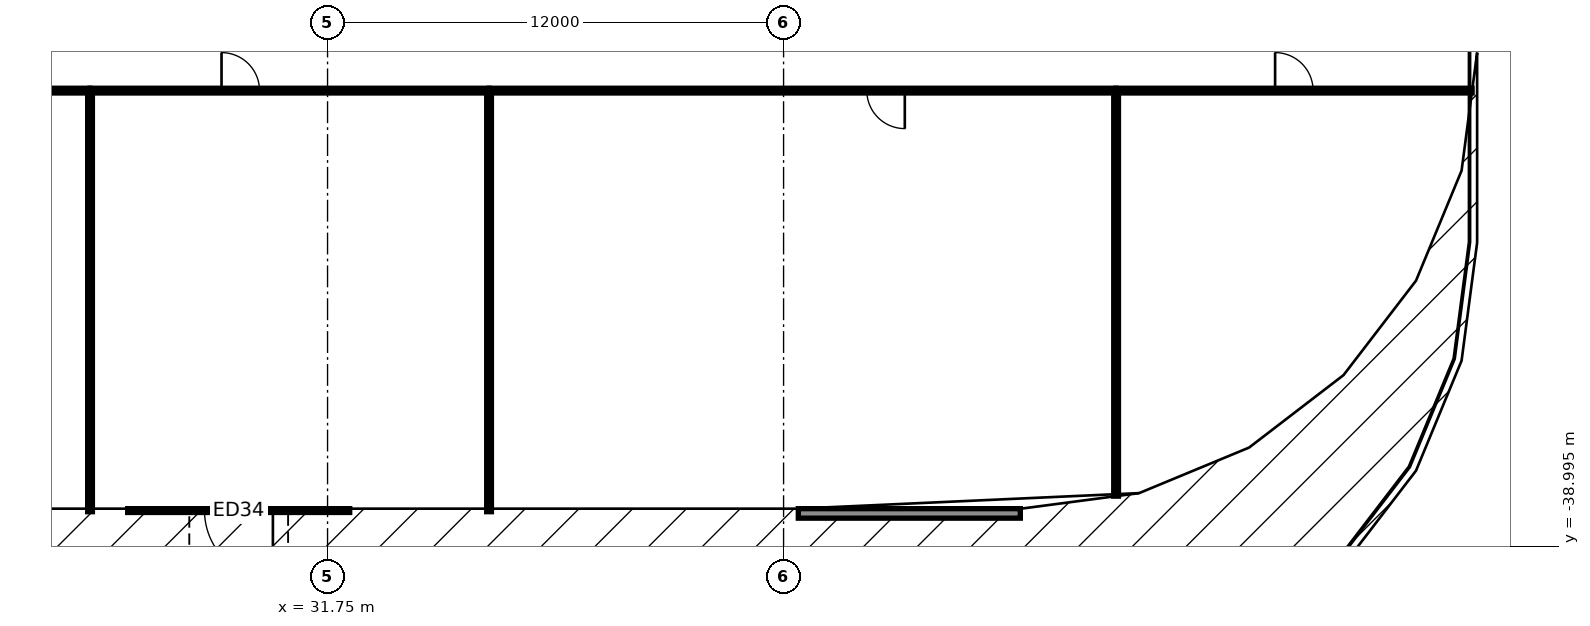
"""IFC4 building model, lengths in metres.
Left out: names, types, materials, properties, quantities, classifications, styles, units other than length and angle.
Written with IfcOpenShell. Run it as: python <this file> out.ifc"""

import sys

from ifc_helpers import new_model, si_unit, direction, frame, frame_2d, origin, origin_2d, place, context, subcontext, project, spatial, rectangle, circle, extrude, element, fill, save


model = new_model("IFC4")
c1 = context("Model", 3, precision=1e-05, world=origin(), true_north=direction((0.0, 1.0)))
c2 = subcontext(c1, "Body", "Model", "MODEL_VIEW")
j1 = project(units=[si_unit("LENGTHUNIT", "METRE"), si_unit("PLANEANGLEUNIT", "RADIAN")], contexts=[c1])
p1 = place(None, origin())
s1 = spatial("IfcSite", under=j1, at=p1, CompositionType="ELEMENT")
p2 = place(p1, origin())
s2 = spatial("IfcBuilding", under=s1, at=p2, CompositionType="ELEMENT")
p3 = place(p2, frame((0.0, 0.0, 12.0)))
s3 = spatial("IfcBuildingStorey", under=s2, at=p3, CompositionType="ELEMENT", Elevation=12.0)
p4 = place(p3, frame((29.4, -31.0, 0.0), z_axis=(0.0, 0.0, 1.0), x_axis=(1.0, 0.0, 0.0)))
e1 = element("IfcColumn", 1, at=p4, inside=s3, PredefinedType="COLUMN", context=c2, shape_type="SweptSolid", body=[
    extrude(circle(Radius=0.6, at=origin_2d()), origin(), (0.0, 0.0, 1.0), 4.5),
])
p5 = place(p3, frame((37.8, -36.0, 0.0), z_axis=(0.0, 0.0, 1.0), x_axis=(1.0, 0.0, 0.0)))
e2 = element("IfcColumn", 2, at=p5, inside=s3, PredefinedType="COLUMN", context=c2, shape_type="SweptSolid", body=[
    extrude(circle(Radius=0.6, at=origin_2d()), origin(), (0.0, 0.0, 1.0), 4.2),
])
for number, where, z_axis, x_axis in (
    (3, (37.8, -31.0, 0.0), (0.0, 0.0, 1.0), (1.0, 0.0, 0.0)),
    (4, (54.6, -26.0, 0.0), (0.0, 0.0, 1.0), (1.0, 0.0, 0.0)),
):
    element("IfcColumn", number, at=place(p3, frame(where, z_axis=z_axis, x_axis=x_axis)), inside=s3, PredefinedType="COLUMN", context=c2, shape_type="SweptSolid", body=[
        extrude(circle(Radius=0.6, at=origin_2d()), origin(), (0.0, 0.0, 1.0), 4.5),
    ])
p6 = place(p3, frame((59.4, -26.0, 0.0), z_axis=(0.0, 0.0, 1.0), x_axis=(1.0, 0.0, 0.0)))
e5 = element("IfcColumn", 5, at=p6, inside=s3, PredefinedType="COLUMN", context=c2, shape_type="SweptSolid", body=[
    extrude(circle(Radius=0.6, at=origin_2d()), origin(), (0.0, 0.0, 1.0), 4.2),
])
p7 = place(p3, frame((49.98, -38.125, 0.0), z_axis=(0.0, 0.0, 1.0), x_axis=(-1.0, 0.0, 0.0)))
e6 = element("IfcWall", 6, at=p7, inside=s3, PredefinedType="STANDARD", context=c2, shape_type="SweptSolid", body=[
    extrude(rectangle(XDim=5.842, YDim=0.25, at=frame_2d((2.921, 0.0))), origin(), (0.0, 0.0, 1.0), 4.5),
])
p8 = place(p7, frame((1.721, 0.0, 0.9)))
e7 = element("IfcOpeningElement", 7, at=p8, cuts=e6, PredefinedType="OPENING", context=c2, shape_type="SweptSolid", body=[
    extrude(rectangle(XDim=2.4, YDim=1.8, at=frame_2d((1.2, 0.9))), frame((0.0, 0.135, 0.0), z_axis=(0.0, -1.0, 0.0), x_axis=(1.0, 0.0, 0.0)), (0.0, 0.0, 1.0), 0.27),
])
p9 = place(p3, frame((32.333, -38.05, 0.0), z_axis=(0.0, 0.0, 1.0), x_axis=(-1.0, 0.0, 0.0)))
e8 = element("IfcWall", 8, at=p9, inside=s3, PredefinedType="STANDARD", context=c2, shape_type="SweptSolid", body=[
    extrude(rectangle(XDim=5.843, YDim=0.1, at=frame_2d((2.921, 0.0))), origin(), (0.0, 0.0, 1.0), 4.5),
])
p10 = place(p9, frame((2.021, 0.0, 0.0)))
e9 = element("IfcOpeningElement", 9, at=p10, cuts=e8, PredefinedType="OPENING", context=c2, shape_type="SweptSolid", body=[
    extrude(rectangle(XDim=1.8, YDim=2.4, at=frame_2d((0.9, 1.2))), frame((0.0, 0.06, 0.0), z_axis=(0.0, -1.0, 0.0), x_axis=(1.0, 0.0, 0.0)), (0.0, 0.0, 1.0), 0.12),
])
p11 = place(p3, frame((15.0, -27.0, 0.0), z_axis=(0.0, 0.0, 1.0), x_axis=(1.0, 0.0, 0.0)))
e10 = element("IfcWall", 10, at=p11, inside=s3, PredefinedType="PARTITIONING", context=c2, shape_type="SweptSolid", body=[
    extrude(rectangle(XDim=10.5, YDim=0.125, at=frame_2d((5.25, 0.0))), origin(), (0.0, 0.0, 1.0), 2.68),
])
p12 = place(p11, frame((4.75, 0.0, 0.0)))
e11 = element("IfcOpeningElement", 11, at=p12, cuts=e10, PredefinedType="OPENING", context=c2, shape_type="SweptSolid", body=[
    extrude(rectangle(XDim=1.0, YDim=2.4, at=frame_2d((0.5, 1.2))), frame((0.0, 0.073, 0.0), z_axis=(0.0, -1.0, 0.0), x_axis=(1.0, 0.0, 0.0)), (0.0, 0.0, 1.0), 0.145),
])
p13 = place(p3, frame((25.5, -27.0, 0.0), z_axis=(0.0, 0.0, 1.0), x_axis=(1.0, 0.0, 0.0)))
e12 = element("IfcWall", 12, at=p13, inside=s3, PredefinedType="PARTITIONING", context=c2, shape_type="SweptSolid", body=[
    extrude(rectangle(XDim=10.5, YDim=0.125, at=frame_2d((5.25, 0.0))), origin(), (0.0, 0.0, 1.0), 2.68),
])
p14 = place(p13, frame((3.46, 0.0, 0.0)))
e13 = element("IfcOpeningElement", 13, at=p14, cuts=e12, PredefinedType="OPENING", context=c2, shape_type="SweptSolid", body=[
    extrude(rectangle(XDim=1.0, YDim=2.1, at=frame_2d((0.5, 1.05))), frame((0.0, 0.073, 0.0), z_axis=(0.0, -1.0, 0.0), x_axis=(1.0, 0.0, 0.0)), (0.0, 0.0, 1.0), 0.145),
])
p15 = place(p3, frame((36.0, -27.0, 0.0), z_axis=(0.0, 0.0, 1.0), x_axis=(1.0, 0.0, 0.0)))
e14 = element("IfcWall", 14, at=p15, inside=s3, PredefinedType="PARTITIONING", context=c2, shape_type="SweptSolid", body=[
    extrude(rectangle(XDim=16.5, YDim=0.125, at=frame_2d((8.25, 0.0))), origin(), (0.0, 0.0, 1.0), 2.68),
])
p16 = place(p15, frame((9.94, 0.0, 0.0)))
e15 = element("IfcOpeningElement", 15, at=p16, cuts=e14, PredefinedType="OPENING", context=c2, shape_type="SweptSolid", body=[
    extrude(rectangle(XDim=1.0, YDim=2.1, at=frame_2d((0.5, 1.05))), frame((0.0, 0.073, 0.0), z_axis=(0.0, -1.0, 0.0), x_axis=(1.0, 0.0, 0.0)), (0.0, 0.0, 1.0), 0.145),
])
p17 = place(p3, frame((52.5, -27.0, 0.0), z_axis=(0.0, 0.0, 1.0), x_axis=(1.0, 0.0, 0.0)))
e16 = element("IfcWall", 16, at=p17, inside=s3, PredefinedType="PARTITIONING", context=c2, shape_type="SweptSolid", body=[
    extrude(rectangle(XDim=9.368, YDim=0.125, at=frame_2d((4.684, 0.0))), origin(), (0.0, 0.0, 1.0), 2.68),
])
p18 = place(p17, frame((4.184, 0.0, 0.0)))
e17 = element("IfcOpeningElement", 17, at=p18, cuts=e16, PredefinedType="OPENING", context=c2, shape_type="SweptSolid", body=[
    extrude(rectangle(XDim=1.0, YDim=2.1, at=frame_2d((0.5, 1.05))), frame((0.0, 0.073, 0.0), z_axis=(0.0, -1.0, 0.0), x_axis=(1.0, 0.0, 0.0)), (0.0, 0.0, 1.0), 0.145),
])
for number, where, z_axis, x_axis in (
    (18, (25.5, -38.08, 0.0), (0.0, 0.0, 1.0), (0.0, 1.0, 0.0)),
    (19, (36.0, -38.08, 0.0), (0.0, 0.0, 1.0), (0.0, 1.0, 0.0)),
):
    element("IfcWall", number, at=place(p3, frame(where, z_axis=z_axis, x_axis=x_axis)), inside=s3, PredefinedType="PARTITIONING", context=c2, shape_type="SweptSolid", body=[
        extrude(rectangle(XDim=11.018, YDim=0.125, at=frame_2d((5.509, 0.0))), origin(), (0.0, 0.0, 1.0), 2.68),
    ])
p19 = place(p3, frame((52.5, -37.671, 0.0), z_axis=(0.0, 0.0, 1.0), x_axis=(0.0, 1.0, 0.0)))
e20 = element("IfcWall", 20, at=p19, inside=s3, PredefinedType="PARTITIONING", context=c2, shape_type="SweptSolid", body=[
    extrude(rectangle(XDim=10.608, YDim=0.125, at=frame_2d((5.304, 0.0))), origin(), (0.0, 0.0, 1.0), 4.2),
])
p20 = place(p8, origin())
e21 = element("IfcWindow", 21, at=p20, inside=s3, PartitioningType="SINGLE_PANEL", PredefinedType="WINDOW", context=c2, shape_type="SweptSolid", body=[
    extrude(rectangle(XDim=2.4, YDim=1.8, at=frame_2d((1.2, 0.9))), frame((0.0, 0.03, 0.0), z_axis=(0.0, -1.0, 0.0), x_axis=(1.0, 0.0, 0.0)), (0.0, 0.0, 1.0), 0.06),
])
fill(e7, e21)
p21 = place(p10, origin())
e22 = element("IfcDoor", 22, at=p21, inside=s3, OperationType="SINGLE_SWING_LEFT", PredefinedType="DOOR", context=c2, shape_type="SweptSolid", body=[
    extrude(rectangle(XDim=1.8, YDim=2.4, at=frame_2d((0.9, 1.2))), frame((0.0, 0.025, 0.0), z_axis=(0.0, -1.0, 0.0), x_axis=(1.0, 0.0, 0.0)), (0.0, 0.0, 1.0), 0.05),
])
fill(e9, e22)
p22 = place(p14, origin())
e23 = element("IfcDoor", 23, at=p22, inside=s3, OperationType="SINGLE_SWING_LEFT", PredefinedType="DOOR", context=c2, shape_type="SweptSolid", body=[
    extrude(rectangle(XDim=1.0, YDim=2.1, at=frame_2d((0.5, 1.05))), frame((0.0, 0.025, 0.0), z_axis=(0.0, -1.0, 0.0), x_axis=(1.0, 0.0, 0.0)), (0.0, 0.0, 1.0), 0.05),
])
fill(e13, e23)
p23 = place(p16, origin())
e24 = element("IfcDoor", 24, at=p23, inside=s3, OperationType="SINGLE_SWING_RIGHT", PredefinedType="DOOR", context=c2, shape_type="SweptSolid", body=[
    extrude(rectangle(XDim=1.0, YDim=2.1, at=frame_2d((0.5, 1.05))), frame((0.0, 0.025, 0.0), z_axis=(0.0, -1.0, 0.0), x_axis=(1.0, 0.0, 0.0)), (0.0, 0.0, 1.0), 0.05),
])
fill(e15, e24)
p24 = place(p18, origin())
e25 = element("IfcDoor", 25, at=p24, inside=s3, OperationType="SINGLE_SWING_LEFT", PredefinedType="DOOR", context=c2, shape_type="SweptSolid", body=[
    extrude(rectangle(XDim=1.0, YDim=2.1, at=frame_2d((0.5, 1.05))), frame((0.0, 0.025, 0.0), z_axis=(0.0, -1.0, 0.0), x_axis=(1.0, 0.0, 0.0)), (0.0, 0.0, 1.0), 0.05),
])
fill(e17, e25)
save(model, sys.argv[1])
